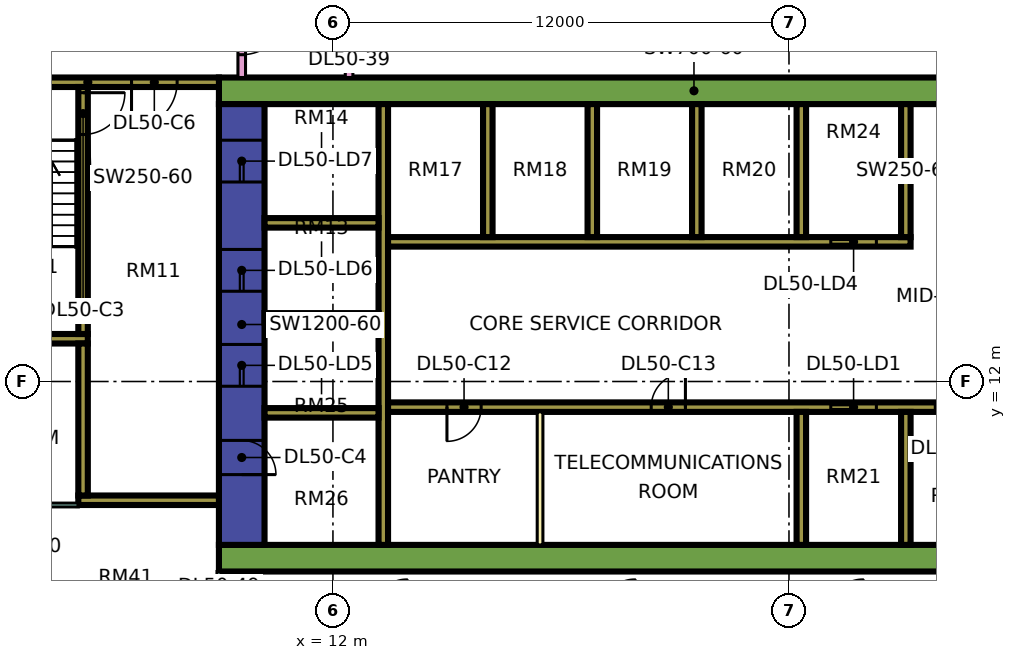
"""IFC4 building model, lengths in metres.
Left out: names, types, materials, properties, quantities, classifications, styles, units other than length and angle.
Written with IfcOpenShell. Run it as: python <this file> out.ifc"""

import sys

from ifc_helpers import new_model, si_unit, direction, frame, frame_2d, origin, place, context, subcontext, project, spatial, rectangle, extrude, element, fill, save


model = new_model("IFC4")
c1 = context("Model", 3, precision=1e-05, world=origin(), true_north=direction((0.0, 1.0)))
c2 = subcontext(c1, "Body", "Model", "MODEL_VIEW")
j1 = project(units=[si_unit("LENGTHUNIT", "METRE"), si_unit("PLANEANGLEUNIT", "RADIAN")], contexts=[c1])
p1 = place(None, origin())
s1 = spatial("IfcSite", under=j1, at=p1, CompositionType="ELEMENT")
p2 = place(p1, origin())
s2 = spatial("IfcBuilding", under=s1, at=p2, CompositionType="ELEMENT")
p3 = place(p2, frame((0.0, 0.0, 215.4)))
s3 = spatial("IfcBuildingStorey", under=s2, at=p3, CompositionType="ELEMENT", Elevation=215.4)
p4 = place(p3, frame((9.0, 7.35, 0.0), z_axis=(0.0, 0.0, 1.0), x_axis=(1.0, 0.0, 0.0)))
e1 = element("IfcWall", 1, at=p4, inside=s3, PredefinedType="SHEAR", context=c2, shape_type="SweptSolid", body=[
    extrude(rectangle(XDim=25.0, YDim=0.7, at=frame_2d((12.5, 0.0))), origin(), (0.0, 0.0, 1.0), 3.75),
])
p5 = place(p3, frame((9.0, 19.65, 0.0), z_axis=(0.0, 0.0, 1.0), x_axis=(1.0, 0.0, 0.0)))
e2 = element("IfcWall", 2, at=p5, inside=s3, PredefinedType="SHEAR", context=c2, shape_type="SweptSolid", body=[
    extrude(rectangle(XDim=25.0, YDim=0.7, at=frame_2d((12.5, 0.0))), origin(), (0.0, 0.0, 1.0), 3.75),
])
p6 = place(p5, frame((19.1, 0.0, 0.0)))
e3 = element("IfcOpeningElement", 3, at=p6, cuts=e2, PredefinedType="OPENING", context=c2, shape_type="SweptSolid", body=[
    extrude(rectangle(XDim=1.8, YDim=2.4, at=frame_2d((0.9, 1.2))), frame((0.0, 0.36, 0.0), z_axis=(0.0, -1.0, 0.0), x_axis=(1.0, 0.0, 0.0)), (0.0, 0.0, 1.0), 0.72),
])
p7 = place(p3, frame((9.6, 7.7, 0.0), z_axis=(0.0, 0.0, 1.0), x_axis=(0.0, 1.0, 0.0)))
e4 = element("IfcWall", 4, at=p7, inside=s3, PredefinedType="SHEAR", context=c2, shape_type="SweptSolid", body=[
    extrude(rectangle(XDim=11.6, YDim=1.2, at=frame_2d((5.8, 0.0))), origin(), (0.0, 0.0, 1.0), 3.75),
])
p8 = place(p7, frame((4.175, 0.0, 0.0)))
e5 = element("IfcOpeningElement", 5, at=p8, cuts=e4, PredefinedType="OPENING", context=c2, shape_type="SweptSolid", body=[
    extrude(rectangle(XDim=1.1, YDim=2.2, at=frame_2d((0.55, 1.1))), frame((0.0, 0.61, 0.0), z_axis=(0.0, -1.0, 0.0), x_axis=(1.0, 0.0, 0.0)), (0.0, 0.0, 1.0), 1.22),
])
p9 = place(p7, frame((6.675, 0.0, 0.0)))
e6 = element("IfcOpeningElement", 6, at=p9, cuts=e4, PredefinedType="OPENING", context=c2, shape_type="SweptSolid", body=[
    extrude(rectangle(XDim=1.1, YDim=2.2, at=frame_2d((0.55, 1.1))), frame((0.0, 0.61, 0.0), z_axis=(0.0, -1.0, 0.0), x_axis=(1.0, 0.0, 0.0)), (0.0, 0.0, 1.0), 1.22),
])
p10 = place(p7, frame((9.55, 0.0, 0.0)))
e7 = element("IfcOpeningElement", 7, at=p10, cuts=e4, PredefinedType="OPENING", context=c2, shape_type="SweptSolid", body=[
    extrude(rectangle(XDim=1.1, YDim=2.2, at=frame_2d((0.55, 1.1))), frame((0.0, 0.61, 0.0), z_axis=(0.0, -1.0, 0.0), x_axis=(1.0, 0.0, 0.0)), (0.0, 0.0, 1.0), 1.22),
])
p11 = place(p7, frame((1.85, 0.0, 0.0)))
e8 = element("IfcOpeningElement", 8, at=p11, cuts=e4, PredefinedType="OPENING", context=c2, shape_type="SweptSolid", body=[
    extrude(rectangle(XDim=0.9, YDim=2.1, at=frame_2d((0.45, 1.05))), frame((0.0, 0.61, 0.0), z_axis=(0.0, -1.0, 0.0), x_axis=(1.0, 0.0, 0.0)), (0.0, 0.0, 1.0), 1.22),
])
p12 = place(p3, frame((13.325, 7.7, 0.0), z_axis=(0.0, 0.0, 1.0), x_axis=(0.0, 1.0, 0.0)))
e9 = element("IfcWall", 9, at=p12, inside=s3, PredefinedType="SHEAR", context=c2, shape_type="SweptSolid", body=[
    extrude(rectangle(XDim=11.6, YDim=0.25, at=frame_2d((5.8, 0.0))), origin(), (0.0, 0.0, 1.0), 3.75),
])
p13 = place(p3, frame((13.45, 11.325, 0.0), z_axis=(0.0, 0.0, 1.0), x_axis=(1.0, 0.0, 0.0)))
e10 = element("IfcWall", 10, at=p13, inside=s3, PredefinedType="SHEAR", context=c2, shape_type="SweptSolid", body=[
    extrude(rectangle(XDim=19.85, YDim=0.25, at=frame_2d((9.925, 0.0))), origin(), (0.0, 0.0, 1.0), 3.75),
])
p14 = place(p13, frame((11.65, 0.0, 0.0)))
e11 = element("IfcOpeningElement", 11, at=p14, cuts=e10, PredefinedType="OPENING", context=c2, shape_type="SweptSolid", body=[
    extrude(rectangle(XDim=1.2, YDim=2.2, at=frame_2d((0.6, 1.1))), frame((0.0, 0.135, 0.0), z_axis=(0.0, -1.0, 0.0), x_axis=(1.0, 0.0, 0.0)), (0.0, 0.0, 1.0), 0.27),
])
p15 = place(p13, frame((14.4, 0.0, 0.0)))
e12 = element("IfcOpeningElement", 12, at=p15, cuts=e10, PredefinedType="OPENING", context=c2, shape_type="SweptSolid", body=[
    extrude(rectangle(XDim=1.2, YDim=2.2, at=frame_2d((0.6, 1.1))), frame((0.0, 0.135, 0.0), z_axis=(0.0, -1.0, 0.0), x_axis=(1.0, 0.0, 0.0)), (0.0, 0.0, 1.0), 0.27),
])
p16 = place(p13, frame((17.15, 0.0, 0.0)))
e13 = element("IfcOpeningElement", 13, at=p16, cuts=e10, PredefinedType="OPENING", context=c2, shape_type="SweptSolid", body=[
    extrude(rectangle(XDim=1.2, YDim=2.2, at=frame_2d((0.6, 1.1))), frame((0.0, 0.135, 0.0), z_axis=(0.0, -1.0, 0.0), x_axis=(1.0, 0.0, 0.0)), (0.0, 0.0, 1.0), 0.27),
])
p17 = place(p13, frame((1.55, 0.0, 0.0)))
e14 = element("IfcOpeningElement", 14, at=p17, cuts=e10, PredefinedType="OPENING", context=c2, shape_type="SweptSolid", body=[
    extrude(rectangle(XDim=0.9, YDim=2.1, at=frame_2d((0.45, 1.05))), frame((0.0, 0.135, 0.0), z_axis=(0.0, -1.0, 0.0), x_axis=(1.0, 0.0, 0.0)), (0.0, 0.0, 1.0), 0.27),
])
p18 = place(p13, frame((6.925, 0.0, 0.0)))
e15 = element("IfcOpeningElement", 15, at=p18, cuts=e10, PredefinedType="OPENING", context=c2, shape_type="SweptSolid", body=[
    extrude(rectangle(XDim=0.9, YDim=2.1, at=frame_2d((0.45, 1.05))), frame((0.0, 0.135, 0.0), z_axis=(0.0, -1.0, 0.0), x_axis=(1.0, 0.0, 0.0)), (0.0, 0.0, 1.0), 0.27),
])
p19 = place(p3, frame((13.45, 15.675, 0.0), z_axis=(0.0, 0.0, 1.0), x_axis=(1.0, 0.0, 0.0)))
e16 = element("IfcWall", 16, at=p19, inside=s3, PredefinedType="SHEAR", context=c2, shape_type="SweptSolid", body=[
    extrude(rectangle(XDim=13.75, YDim=0.25, at=frame_2d((6.875, 0.0))), origin(), (0.0, 0.0, 1.0), 3.75),
])
p20 = place(p19, frame((11.65, 0.0, 0.0)))
e17 = element("IfcOpeningElement", 17, at=p20, cuts=e16, PredefinedType="OPENING", context=c2, shape_type="SweptSolid", body=[
    extrude(rectangle(XDim=1.2, YDim=2.2, at=frame_2d((0.6, 1.1))), frame((0.0, 0.135, 0.0), z_axis=(0.0, -1.0, 0.0), x_axis=(1.0, 0.0, 0.0)), (0.0, 0.0, 1.0), 0.27),
])
for number, where, z_axis, x_axis in (
    (18, (10.2, 11.175, 0.0), (0.0, 0.0, 1.0), (1.0, 0.0, 0.0)),
    (19, (10.2, 13.675, 0.0), (0.0, 0.0, 1.0), (1.0, 0.0, 0.0)),
    (20, (10.2, 16.175, 0.0), (0.0, 0.0, 1.0), (1.0, 0.0, 0.0)),
):
    element("IfcWall", number, at=place(p3, frame(where, z_axis=z_axis, x_axis=x_axis)), inside=s3, PredefinedType="SHEAR", context=c2, shape_type="SweptSolid", body=[
        extrude(rectangle(XDim=3.0, YDim=0.25, at=frame_2d((1.5, 0.0))), origin(), (0.0, 0.0, 1.0), 3.75),
    ])
for number, where, z_axis, x_axis in (
    (21, (24.325, 7.7, 0.0), (0.0, 0.0, 1.0), (0.0, 1.0, 0.0)),
    (22, (27.075, 7.7, 0.0), (0.0, 0.0, 1.0), (0.0, 1.0, 0.0)),
    (23, (16.075, 15.8, 0.0), (0.0, 0.0, 1.0), (0.0, 1.0, 0.0)),
    (24, (18.825, 15.8, 0.0), (0.0, 0.0, 1.0), (0.0, 1.0, 0.0)),
    (25, (21.575, 15.8, 0.0), (0.0, 0.0, 1.0), (0.0, 1.0, 0.0)),
    (26, (24.325, 15.8, 0.0), (0.0, 0.0, 1.0), (0.0, 1.0, 0.0)),
    (27, (27.075, 15.8, 0.0), (0.0, 0.0, 1.0), (0.0, 1.0, 0.0)),
):
    element("IfcWall", number, at=place(p3, frame(where, z_axis=z_axis, x_axis=x_axis)), inside=s3, PredefinedType="SHEAR", context=c2, shape_type="SweptSolid", body=[
        extrude(rectangle(XDim=3.5, YDim=0.25, at=frame_2d((1.75, 0.0))), origin(), (0.0, 0.0, 1.0), 3.75),
    ])
p21 = place(p3, frame((2.1, 19.875, 0.0), z_axis=(0.0, 0.0, 1.0), x_axis=(1.0, 0.0, 0.0)))
e28 = element("IfcWall", 28, at=p21, inside=s3, PredefinedType="SHEAR", context=c2, shape_type="SweptSolid", body=[
    extrude(rectangle(XDim=6.9, YDim=0.25, at=frame_2d((3.45, 0.0))), origin(), (0.0, 0.0, 1.0), 3.75),
])
p22 = place(p21, frame((1.175, 0.0, 0.0)))
e29 = element("IfcOpeningElement", 29, at=p22, cuts=e28, PredefinedType="OPENING", context=c2, shape_type="SweptSolid", body=[
    extrude(rectangle(XDim=1.1, YDim=2.2, at=frame_2d((0.55, 1.1))), frame((0.0, 0.135, 0.0), z_axis=(0.0, -1.0, 0.0), x_axis=(1.0, 0.0, 0.0)), (0.0, 0.0, 1.0), 0.27),
])
p23 = place(p21, frame((4.6, 0.0, 0.0)))
e30 = element("IfcOpeningElement", 30, at=p23, cuts=e28, PredefinedType="OPENING", context=c2, shape_type="SweptSolid", body=[
    extrude(rectangle(XDim=1.2, YDim=2.2, at=frame_2d((0.6, 1.1))), frame((0.0, 0.135, 0.0), z_axis=(0.0, -1.0, 0.0), x_axis=(1.0, 0.0, 0.0)), (0.0, 0.0, 1.0), 0.27),
])
p24 = place(p3, frame((2.1, 13.125, 0.0), z_axis=(0.0, 0.0, 1.0), x_axis=(1.0, 0.0, 0.0)))
e31 = element("IfcWall", 31, at=p24, inside=s3, PredefinedType="SHEAR", context=c2, shape_type="SweptSolid", body=[
    extrude(rectangle(XDim=3.45, YDim=0.25, at=frame_2d((1.725, 0.0))), origin(), (0.0, 0.0, 1.0), 3.75),
])
p25 = place(p3, frame((5.425, 13.25, 0.0), z_axis=(0.0, 0.0, 1.0), x_axis=(0.0, 1.0, 0.0)))
e32 = element("IfcWall", 32, at=p25, inside=s3, PredefinedType="SHEAR", context=c2, shape_type="SweptSolid", body=[
    extrude(rectangle(XDim=6.5, YDim=0.25, at=frame_2d((3.25, 0.0))), origin(), (0.0, 0.0, 1.0), 3.75),
])
p26 = place(p25, frame((5.25, 0.0, 0.0)))
e33 = element("IfcOpeningElement", 33, at=p26, cuts=e32, PredefinedType="OPENING", context=c2, shape_type="SweptSolid", body=[
    extrude(rectangle(XDim=1.1, YDim=2.2, at=frame_2d((0.55, 1.1))), frame((0.0, 0.135, 0.0), z_axis=(0.0, -1.0, 0.0), x_axis=(1.0, 0.0, 0.0)), (0.0, 0.0, 1.0), 0.27),
])
p27 = place(p3, frame((5.3, 8.875, 0.0), z_axis=(0.0, 0.0, 1.0), x_axis=(1.0, 0.0, 0.0)))
e34 = element("IfcWall", 34, at=p27, inside=s3, PredefinedType="SHEAR", context=c2, shape_type="SweptSolid", body=[
    extrude(rectangle(XDim=3.7, YDim=0.25, at=frame_2d((1.85, 0.0))), origin(), (0.0, 0.0, 1.0), 3.75),
])
p28 = place(p3, frame((5.425, 9.0, 0.0), z_axis=(0.0, 0.0, 1.0), x_axis=(0.0, 1.0, 0.0)))
e35 = element("IfcWall", 35, at=p28, inside=s3, PredefinedType="SHEAR", context=c2, shape_type="SweptSolid", body=[
    extrude(rectangle(XDim=4.0, YDim=0.25, at=frame_2d((2.0, 0.0))), origin(), (0.0, 0.0, 1.0), 3.75),
])
p29 = place(p3, frame((-1.447, 12.553, 0.0), z_axis=(0.0, 0.0, 1.0), x_axis=(0.707106781187, -0.707106781187, 0.0)))
e36 = element("IfcWall", 36, at=p29, inside=s3, PredefinedType="SOLIDWALL", context=c2, shape_type="SweptSolid", body=[
    extrude(rectangle(XDim=19.799, YDim=0.15, at=frame_2d((9.899, 0.0))), origin(), (0.0, 0.0, 1.0), 3.35),
])
p30 = place(p29, frame((2.212, 0.0, 0.45)))
e37 = element("IfcOpeningElement", 37, at=p30, cuts=e36, PredefinedType="OPENING", context=c2, shape_type="SweptSolid", body=[
    extrude(rectangle(XDim=3.0, YDim=2.4, at=frame_2d((1.5, 1.2))), frame((0.0, 0.085, 0.0), z_axis=(0.0, -1.0, 0.0), x_axis=(1.0, 0.0, 0.0)), (0.0, 0.0, 1.0), 0.17),
])
p31 = place(p29, frame((10.216, 0.0, 0.45)))
e38 = element("IfcOpeningElement", 38, at=p31, cuts=e36, PredefinedType="OPENING", context=c2, shape_type="SweptSolid", body=[
    extrude(rectangle(XDim=3.0, YDim=2.4, at=frame_2d((1.5, 1.2))), frame((0.0, 0.085, 0.0), z_axis=(0.0, -1.0, 0.0), x_axis=(1.0, 0.0, 0.0)), (0.0, 0.0, 1.0), 0.17),
])
p32 = place(p3, frame((17.45, 7.7, 0.0), z_axis=(0.0, 0.0, 1.0), x_axis=(0.0, 1.0, 0.0)))
e39 = element("IfcWall", 39, at=p32, inside=s3, PredefinedType="PARTITIONING", context=c2, shape_type="SweptSolid", body=[
    extrude(rectangle(XDim=3.5, YDim=0.15, at=frame_2d((1.75, 0.0))), origin(), (0.0, 0.0, 1.0), 3.35),
])
p33 = place(p3, frame((2.461, 8.75, 0.0), z_axis=(0.0, 0.0, 1.0), x_axis=(1.0, 0.0, 0.0)))
e40 = element("IfcWall", 40, at=p33, inside=s3, PredefinedType="PARTITIONING", context=c2, shape_type="SweptSolid", body=[
    extrude(rectangle(XDim=2.839, YDim=0.1, at=frame_2d((1.419, 0.0))), origin(), (0.0, 0.0, 1.0), 3.35),
])
p34 = place(p33, frame((0.889, 0.0, 0.0)))
e41 = element("IfcOpeningElement", 41, at=p34, cuts=e40, PredefinedType="OPENING", context=c2, shape_type="SweptSolid", body=[
    extrude(rectangle(XDim=0.9, YDim=2.1, at=frame_2d((0.45, 1.05))), frame((0.0, 0.06, 0.0), z_axis=(0.0, -1.0, 0.0), x_axis=(1.0, 0.0, 0.0)), (0.0, 0.0, 1.0), 0.12),
])
p35 = place(p3, frame((9.0, 3.95, 0.0), z_axis=(0.0, 0.0, 1.0), x_axis=(0.0, 1.0, 0.0)))
e42 = element("IfcWall", 42, at=p35, inside=s3, PredefinedType="PARTITIONING", context=c2, shape_type="SweptSolid", body=[
    extrude(rectangle(XDim=3.05, YDim=0.1, at=frame_2d((1.525, 0.0))), origin(), (0.0, 0.0, 1.0), 3.35),
])
p36 = place(p35, frame((1.1, 0.0, 0.0)))
e43 = element("IfcOpeningElement", 43, at=p36, cuts=e42, PredefinedType="OPENING", context=c2, shape_type="SweptSolid", body=[
    extrude(rectangle(XDim=0.9, YDim=2.1, at=frame_2d((0.45, 1.05))), frame((0.0, 0.06, 0.0), z_axis=(0.0, -1.0, 0.0), x_axis=(1.0, 0.0, 0.0)), (0.0, 0.0, 1.0), 0.12),
])
p37 = place(p3, frame((9.6, 20.0, 0.0), z_axis=(0.0, 0.0, 1.0), x_axis=(0.0, 1.0, 0.0)))
e44 = element("IfcWall", 44, at=p37, inside=s3, PredefinedType="PARTITIONING", context=c2, shape_type="SweptSolid", body=[
    extrude(rectangle(XDim=44.35, YDim=0.2, at=frame_2d((22.175, 0.0))), origin(), (0.0, 0.0, 1.0), 3.35),
])
p38 = place(p37, frame((17.25, 0.0, 0.0)))
e45 = element("IfcOpeningElement", 45, at=p38, cuts=e44, PredefinedType="OPENING", context=c2, shape_type="SweptSolid", body=[
    extrude(rectangle(XDim=1.0, YDim=2.1, at=frame_2d((0.5, 1.05))), frame((0.0, 0.11, 0.0), z_axis=(0.0, -1.0, 0.0), x_axis=(1.0, 0.0, 0.0)), (0.0, 0.0, 1.0), 0.22),
])
p39 = place(p37, frame((0.6, 0.0, 0.0)))
e46 = element("IfcOpeningElement", 46, at=p39, cuts=e44, PredefinedType="OPENING", context=c2, shape_type="SweptSolid", body=[
    extrude(rectangle(XDim=1.2, YDim=2.1, at=frame_2d((0.6, 1.05))), frame((0.0, 0.11, 0.0), z_axis=(0.0, -1.0, 0.0), x_axis=(1.0, 0.0, 0.0)), (0.0, 0.0, 1.0), 0.22),
])
p40 = place(p37, frame((4.35, 0.0, 0.0)))
e47 = element("IfcOpeningElement", 47, at=p40, cuts=e44, PredefinedType="OPENING", context=c2, shape_type="SweptSolid", body=[
    extrude(rectangle(XDim=1.0, YDim=2.1, at=frame_2d((0.5, 1.05))), frame((0.0, 0.11, 0.0), z_axis=(0.0, -1.0, 0.0), x_axis=(1.0, 0.0, 0.0)), (0.0, 0.0, 1.0), 0.22),
])
p41 = place(p3, frame((12.425, 20.0, 0.0), z_axis=(0.0, 0.0, 1.0), x_axis=(0.0, 1.0, 0.0)))
e48 = element("IfcWall", 48, at=p41, inside=s3, PredefinedType="PARTITIONING", context=c2, shape_type="SweptSolid", body=[
    extrude(rectangle(XDim=42.926, YDim=0.2, at=frame_2d((21.463, 0.0))), origin(), (0.0, 0.0, 1.0), 3.35),
])
p42 = place(p41, frame((7.0, 0.0, 0.0)))
e49 = element("IfcOpeningElement", 49, at=p42, cuts=e48, PredefinedType="OPENING", context=c2, shape_type="SweptSolid", body=[
    extrude(rectangle(XDim=1.0, YDim=2.1, at=frame_2d((0.5, 1.05))), frame((0.0, 0.11, 0.0), z_axis=(0.0, -1.0, 0.0), x_axis=(1.0, 0.0, 0.0)), (0.0, 0.0, 1.0), 0.22),
])
p43 = place(p41, frame((12.95, 0.0, 0.0)))
e50 = element("IfcOpeningElement", 50, at=p43, cuts=e48, PredefinedType="OPENING", context=c2, shape_type="SweptSolid", body=[
    extrude(rectangle(XDim=1.0, YDim=2.1, at=frame_2d((0.5, 1.05))), frame((0.0, 0.11, 0.0), z_axis=(0.0, -1.0, 0.0), x_axis=(1.0, 0.0, 0.0)), (0.0, 0.0, 1.0), 0.22),
])
p44 = place(p41, frame((23.35, 0.0, 0.0)))
e51 = element("IfcOpeningElement", 51, at=p44, cuts=e48, PredefinedType="OPENING", context=c2, shape_type="SweptSolid", body=[
    extrude(rectangle(XDim=1.0, YDim=2.1, at=frame_2d((0.5, 1.05))), frame((0.0, 0.11, 0.0), z_axis=(0.0, -1.0, 0.0), x_axis=(1.0, 0.0, 0.0)), (0.0, 0.0, 1.0), 0.22),
])
p45 = place(p41, frame((35.2, 0.0, 0.0)))
e52 = element("IfcOpeningElement", 52, at=p45, cuts=e48, PredefinedType="OPENING", context=c2, shape_type="SweptSolid", body=[
    extrude(rectangle(XDim=1.0, YDim=2.1, at=frame_2d((0.5, 1.05))), frame((0.0, 0.11, 0.0), z_axis=(0.0, -1.0, 0.0), x_axis=(1.0, 0.0, 0.0)), (0.0, 0.0, 1.0), 0.22),
])
p46 = place(p41, frame((1.15, 0.0, 0.0)))
e53 = element("IfcOpeningElement", 53, at=p46, cuts=e48, PredefinedType="OPENING", context=c2, shape_type="SweptSolid", body=[
    extrude(rectangle(XDim=1.8, YDim=2.1, at=frame_2d((0.9, 1.05))), frame((0.0, 0.11, 0.0), z_axis=(0.0, -1.0, 0.0), x_axis=(1.0, 0.0, 0.0)), (0.0, 0.0, 1.0), 0.22),
])
p47 = place(p41, frame((28.6, 0.0, 0.0)))
e54 = element("IfcOpeningElement", 54, at=p47, cuts=e48, PredefinedType="OPENING", context=c2, shape_type="SweptSolid", body=[
    extrude(rectangle(XDim=1.8, YDim=2.1, at=frame_2d((0.9, 1.05))), frame((0.0, 0.11, 0.0), z_axis=(0.0, -1.0, 0.0), x_axis=(1.0, 0.0, 0.0)), (0.0, 0.0, 1.0), 0.22),
])
p48 = place(p14, origin())
e55 = element("IfcDoor", 55, at=p48, inside=s3, OperationType="DOUBLE_DOOR_SLIDING", PredefinedType="DOOR", context=c2, shape_type="SweptSolid", body=[
    extrude(rectangle(XDim=1.2, YDim=2.2, at=frame_2d((0.6, 1.1))), frame((0.0, 0.025, 0.0), z_axis=(0.0, -1.0, 0.0), x_axis=(1.0, 0.0, 0.0)), (0.0, 0.0, 1.0), 0.05),
])
fill(e11, e55)
p49 = place(p15, origin())
e56 = element("IfcDoor", 56, at=p49, inside=s3, OperationType="DOUBLE_DOOR_SLIDING", PredefinedType="DOOR", context=c2, shape_type="SweptSolid", body=[
    extrude(rectangle(XDim=1.2, YDim=2.2, at=frame_2d((0.6, 1.1))), frame((0.0, 0.025, 0.0), z_axis=(0.0, -1.0, 0.0), x_axis=(1.0, 0.0, 0.0)), (0.0, 0.0, 1.0), 0.05),
])
fill(e12, e56)
p50 = place(p20, origin())
e57 = element("IfcDoor", 57, at=p50, inside=s3, OperationType="DOUBLE_DOOR_SLIDING", PredefinedType="DOOR", context=c2, shape_type="SweptSolid", body=[
    extrude(rectangle(XDim=1.2, YDim=2.2, at=frame_2d((0.6, 1.1))), frame((0.0, 0.025, 0.0), z_axis=(0.0, -1.0, 0.0), x_axis=(1.0, 0.0, 0.0)), (0.0, 0.0, 1.0), 0.05),
])
fill(e17, e57)
p51 = place(p8, origin())
e58 = element("IfcDoor", 58, at=p51, inside=s3, OperationType="DOUBLE_DOOR_SLIDING", PredefinedType="DOOR", context=c2, shape_type="SweptSolid", body=[
    extrude(rectangle(XDim=1.1, YDim=2.2, at=frame_2d((0.55, 1.1))), frame((0.0, 0.025, 0.0), z_axis=(0.0, -1.0, 0.0), x_axis=(1.0, 0.0, 0.0)), (0.0, 0.0, 1.0), 0.05),
])
fill(e5, e58)
p52 = place(p9, origin())
e59 = element("IfcDoor", 59, at=p52, inside=s3, OperationType="DOUBLE_DOOR_SLIDING", PredefinedType="DOOR", context=c2, shape_type="SweptSolid", body=[
    extrude(rectangle(XDim=1.1, YDim=2.2, at=frame_2d((0.55, 1.1))), frame((0.0, 0.025, 0.0), z_axis=(0.0, -1.0, 0.0), x_axis=(1.0, 0.0, 0.0)), (0.0, 0.0, 1.0), 0.05),
])
fill(e6, e59)
p53 = place(p10, origin())
e60 = element("IfcDoor", 60, at=p53, inside=s3, OperationType="DOUBLE_DOOR_SLIDING", PredefinedType="DOOR", context=c2, shape_type="SweptSolid", body=[
    extrude(rectangle(XDim=1.1, YDim=2.2, at=frame_2d((0.55, 1.1))), frame((0.0, 0.025, 0.0), z_axis=(0.0, -1.0, 0.0), x_axis=(1.0, 0.0, 0.0)), (0.0, 0.0, 1.0), 0.05),
])
fill(e7, e60)
p54 = place(p26, origin())
e61 = element("IfcDoor", 61, at=p54, inside=s3, OperationType="SINGLE_SWING_RIGHT", PredefinedType="DOOR", context=c2, shape_type="SweptSolid", body=[
    extrude(rectangle(XDim=1.1, YDim=2.2, at=frame_2d((0.55, 1.1))), frame((0.0, 0.025, 0.0), z_axis=(0.0, -1.0, 0.0), x_axis=(1.0, 0.0, 0.0)), (0.0, 0.0, 1.0), 0.05),
])
fill(e33, e61)
p55 = place(p11, frame((0.9, 0.0, 0.0), z_axis=(0.0, 0.0, 1.0), x_axis=(-1.0, 0.0, 0.0)))
e62 = element("IfcDoor", 62, at=p55, inside=s3, OperationType="SINGLE_SWING_LEFT", PredefinedType="DOOR", context=c2, shape_type="SweptSolid", body=[
    extrude(rectangle(XDim=0.9, YDim=2.1, at=frame_2d((0.45, 1.05))), frame((0.0, 0.025, 0.0), z_axis=(0.0, -1.0, 0.0), x_axis=(1.0, 0.0, 0.0)), (0.0, 0.0, 1.0), 0.05),
])
fill(e8, e62)
p56 = place(p23, frame((1.2, 0.0, 0.0), z_axis=(0.0, 0.0, 1.0), x_axis=(-1.0, 0.0, 0.0)))
e63 = element("IfcDoor", 63, at=p56, inside=s3, OperationType="SINGLE_SWING_LEFT", PredefinedType="DOOR", context=c2, shape_type="SweptSolid", body=[
    extrude(rectangle(XDim=1.2, YDim=2.2, at=frame_2d((0.6, 1.1))), frame((0.0, 0.025, 0.0), z_axis=(0.0, -1.0, 0.0), x_axis=(1.0, 0.0, 0.0)), (0.0, 0.0, 1.0), 0.05),
])
fill(e30, e63)
p57 = place(p17, frame((0.9, 0.0, 0.0), z_axis=(0.0, 0.0, 1.0), x_axis=(-1.0, 0.0, 0.0)))
e64 = element("IfcDoor", 64, at=p57, inside=s3, OperationType="SINGLE_SWING_LEFT", PredefinedType="DOOR", context=c2, shape_type="SweptSolid", body=[
    extrude(rectangle(XDim=0.9, YDim=2.1, at=frame_2d((0.45, 1.05))), frame((0.0, 0.025, 0.0), z_axis=(0.0, -1.0, 0.0), x_axis=(1.0, 0.0, 0.0)), (0.0, 0.0, 1.0), 0.05),
])
fill(e14, e64)
p58 = place(p18, frame((0.9, 0.0, 0.0), z_axis=(0.0, 0.0, 1.0), x_axis=(-1.0, 0.0, 0.0)))
e65 = element("IfcDoor", 65, at=p58, inside=s3, OperationType="SINGLE_SWING_RIGHT", PredefinedType="DOOR", context=c2, shape_type="SweptSolid", body=[
    extrude(rectangle(XDim=0.9, YDim=2.1, at=frame_2d((0.45, 1.05))), frame((0.0, 0.025, 0.0), z_axis=(0.0, -1.0, 0.0), x_axis=(1.0, 0.0, 0.0)), (0.0, 0.0, 1.0), 0.05),
])
fill(e15, e65)
p59 = place(p39, origin())
e66 = element("IfcDoor", 66, at=p59, inside=s3, OperationType="SINGLE_SWING_RIGHT", PredefinedType="DOOR", context=c2, shape_type="SweptSolid", body=[
    extrude(rectangle(XDim=1.2, YDim=2.1, at=frame_2d((0.6, 1.05))), frame((0.0, 0.025, 0.0), z_axis=(0.0, -1.0, 0.0), x_axis=(1.0, 0.0, 0.0)), (0.0, 0.0, 1.0), 0.05),
])
fill(e46, e66)
save(model, sys.argv[1])
